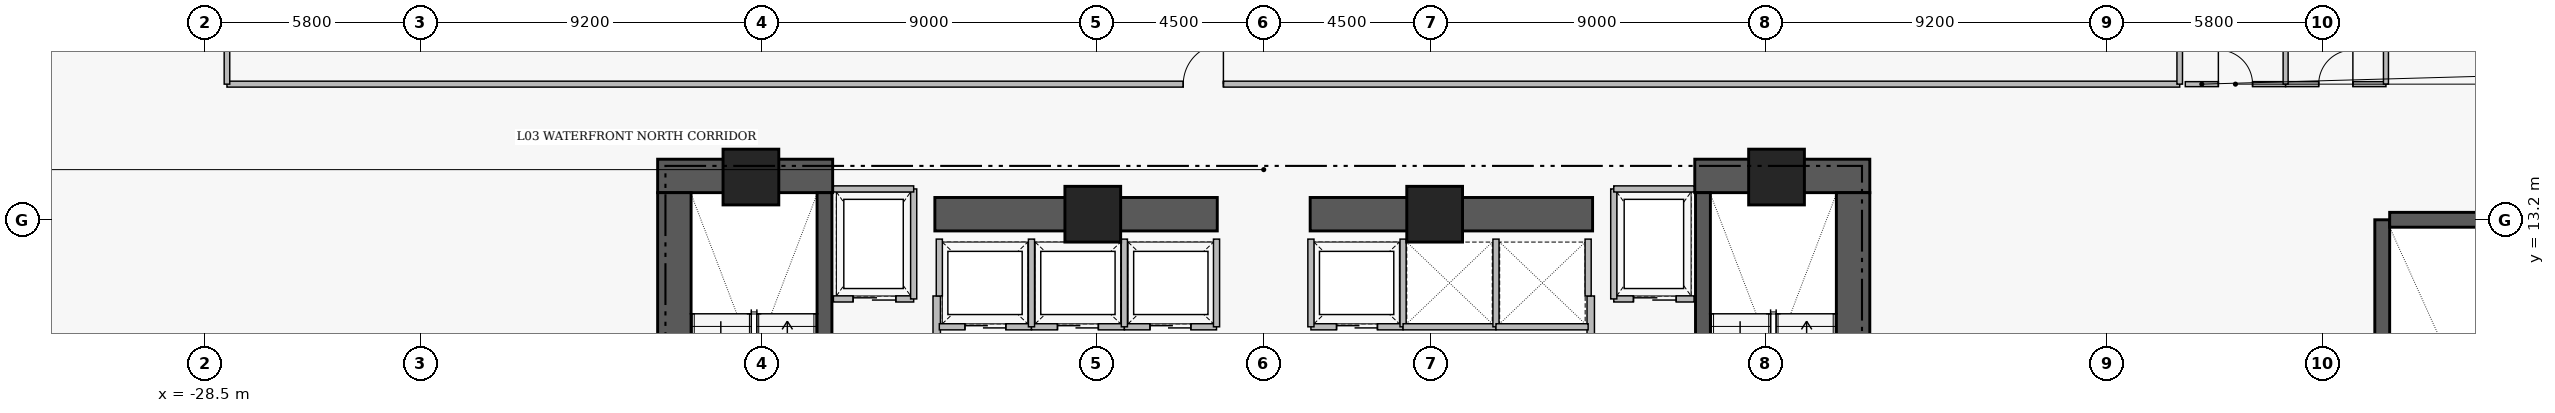
"""IFC4 building model, lengths in metres.
Left out: names, types, materials, properties, quantities, classifications, styles, units other than length and angle.
Written with IfcOpenShell. Run it as: python <this file> out.ifc"""

import sys

from ifc_helpers import new_model, si_unit, direction, frame, frame_2d, origin, origin_2d, place, context, subcontext, project, spatial, rectangle, extrude, element, fill, save


model = new_model("IFC4")
c1 = context("Model", 3, precision=1e-05, world=origin(), true_north=direction((0.0, 1.0)))
c2 = subcontext(c1, "Body", "Model", "MODEL_VIEW")
j1 = project(units=[si_unit("LENGTHUNIT", "METRE"), si_unit("PLANEANGLEUNIT", "RADIAN")], contexts=[c1])
p1 = place(None, origin())
s1 = spatial("IfcSite", under=j1, at=p1, CompositionType="ELEMENT")
p2 = place(p1, origin())
s2 = spatial("IfcBuilding", under=s1, at=p2, CompositionType="ELEMENT")
p3 = place(p2, frame((0.0, 0.0, 18.0)))
s3 = spatial("IfcBuildingStorey", under=s2, at=p3, CompositionType="ELEMENT", Elevation=18.0)
for number, where, z_axis, x_axis in (
    (1, (-16.31, 14.38, 0.0), (0.0, 0.0, 1.0), (1.0, 0.0, 0.0)),
    (2, (11.6, 14.38, 0.0), (0.0, 0.0, 1.0), (1.0, 0.0, 0.0)),
):
    element("IfcWall", number, at=place(p3, frame(where, z_axis=z_axis, x_axis=x_axis)), inside=s3, PredefinedType="SHEAR", context=c2, shape_type="SweptSolid", body=[
        extrude(rectangle(XDim=4.71, YDim=0.9, at=frame_2d((2.355, 0.0))), origin(), (0.0, 0.0, 1.0), 4.61),
    ])
for number, where, z_axis, x_axis in (
    (3, (-15.86, 4.97, 0.0), (0.0, 0.0, 1.0), (0.0, 1.0, 0.0)),
    (4, (15.86, 4.97, 0.0), (0.0, 0.0, 1.0), (0.0, 1.0, 0.0)),
):
    element("IfcWall", number, at=place(p3, frame(where, z_axis=z_axis, x_axis=x_axis)), inside=s3, PredefinedType="SHEAR", context=c2, shape_type="SweptSolid", body=[
        extrude(rectangle(XDim=8.96, YDim=0.9, at=frame_2d((4.48, 0.0))), origin(), (0.0, 0.0, 1.0), 4.61),
    ])
for number, where, z_axis, x_axis in (
    (5, (-8.85, 13.35, 0.0), (0.0, 0.0, 1.0), (1.0, 0.0, 0.0)),
    (6, (1.25, 13.35, 0.0), (0.0, 0.0, 1.0), (1.0, 0.0, 0.0)),
):
    element("IfcWall", number, at=place(p3, frame(where, z_axis=z_axis, x_axis=x_axis)), inside=s3, PredefinedType="SHEAR", context=c2, shape_type="SweptSolid", body=[
        extrude(rectangle(XDim=7.6, YDim=0.9, at=frame_2d((3.8, 0.0))), origin(), (0.0, 0.0, 1.0), 4.54),
    ])
p4 = place(p3, frame((-11.82, 4.97, 0.0), z_axis=(0.0, 0.0, 1.0), x_axis=(0.0, 1.0, 0.0)))
e7 = element("IfcWall", 7, at=p4, inside=s3, PredefinedType="SHEAR", context=c2, shape_type="SweptSolid", body=[
    extrude(rectangle(XDim=8.96, YDim=0.4, at=frame_2d((4.48, 0.0))), origin(), (0.0, 0.0, 1.0), 4.61),
])
p5 = place(p4, frame((0.31, 0.0, 0.0)))
e8 = element("IfcOpeningElement", 8, at=p5, cuts=e7, PredefinedType="OPENING", context=c2, shape_type="SweptSolid", body=[
    extrude(rectangle(XDim=1.12, YDim=2.22, at=frame_2d((0.56, 1.11))), frame((0.0, 0.21, 0.0), z_axis=(0.0, -1.0, 0.0), x_axis=(1.0, 0.0, 0.0)), (0.0, 0.0, 1.0), 0.42),
])
p6 = place(p3, frame((11.82, 13.93, 0.0), z_axis=(0.0, 0.0, 1.0), x_axis=(0.0, -1.0, 0.0)))
e9 = element("IfcWall", 9, at=p6, inside=s3, PredefinedType="SHEAR", context=c2, shape_type="SweptSolid", body=[
    extrude(rectangle(XDim=8.96, YDim=0.4, at=frame_2d((4.48, 0.0))), origin(), (0.0, 0.0, 1.0), 4.61),
])
p7 = place(p6, frame((7.53, 0.0, 0.0)))
e10 = element("IfcOpeningElement", 10, at=p7, cuts=e9, PredefinedType="OPENING", context=c2, shape_type="SweptSolid", body=[
    extrude(rectangle(XDim=1.12, YDim=2.22, at=frame_2d((0.56, 1.11))), frame((0.0, 0.21, 0.0), z_axis=(0.0, -1.0, 0.0), x_axis=(1.0, 0.0, 0.0)), (0.0, 0.0, 1.0), 0.42),
])
p8 = place(p3, frame((30.1, 13.2, 0.0), z_axis=(0.0, 0.0, 1.0), x_axis=(0.0, -1.0, 0.0)))
e11 = element("IfcWall", 11, at=p8, inside=s3, PredefinedType="SHEAR", context=c2, shape_type="SweptSolid", body=[
    extrude(rectangle(XDim=11.8, YDim=0.4, at=frame_2d((5.9, 0.0))), origin(), (0.0, 0.0, 1.0), 4.61),
])
p9 = place(p8, frame((9.7, 0.0, 0.0)))
e12 = element("IfcOpeningElement", 12, at=p9, cuts=e11, PredefinedType="OPENING", context=c2, shape_type="SweptSolid", body=[
    extrude(rectangle(XDim=1.12, YDim=2.22, at=frame_2d((0.56, 1.11))), frame((0.0, 0.21, 0.0), z_axis=(0.0, -1.0, 0.0), x_axis=(1.0, 0.0, 0.0)), (0.0, 0.0, 1.0), 0.42),
])
p10 = place(p3, frame((30.3, 13.2, 0.0), z_axis=(0.0, 0.0, 1.0), x_axis=(1.0, 0.0, 0.0)))
e13 = element("IfcWall", 13, at=p10, inside=s3, PredefinedType="SHEAR", context=c2, shape_type="SweptSolid", body=[
    extrude(rectangle(XDim=5.35, YDim=0.4, at=frame_2d((2.675, 0.0))), origin(), (0.0, 0.0, 1.0), 4.61),
])
for number, where, z_axis, x_axis in (
    (14, (-13.8, 14.35, 0.0), (0.0, 0.0, 1.0), (1.0, 0.0, 0.0)),
    (15, (-4.6, 13.35, 0.0), (0.0, 0.0, 1.0), (1.0, 0.0, 0.0)),
    (16, (4.6, 13.35, 0.0), (0.0, 0.0, 1.0), (1.0, 0.0, 0.0)),
    (17, (13.8, 14.35, 0.0), (0.0, 0.0, 1.0), (1.0, 0.0, 0.0)),
):
    element("IfcColumn", number, at=place(p3, frame(where, z_axis=z_axis, x_axis=x_axis)), inside=s3, PredefinedType="COLUMN", context=c2, shape_type="SweptSolid", body=[
        extrude(rectangle(XDim=1.5, YDim=1.5, at=origin_2d()), origin(), (0.0, 0.0, 1.0), 4.8),
    ])
p11 = place(p3, frame((-8.8, 5.05, 0.0), z_axis=(0.0, 0.0, 1.0), x_axis=(0.0, 1.0, 0.0)))
e18 = element("IfcWall", 18, at=p11, inside=s3, PredefinedType="PARTITIONING", context=c2, shape_type="SweptSolid", body=[
    extrude(rectangle(XDim=6.1, YDim=0.2, at=frame_2d((3.05, 0.0))), origin(), (0.0, 0.0, 1.0), 4.54),
])
p12 = place(p11, frame((0.25, 0.0, 0.0)))
e19 = element("IfcOpeningElement", 19, at=p12, cuts=e18, PredefinedType="OPENING", context=c2, shape_type="SweptSolid", body=[
    extrude(rectangle(XDim=1.1, YDim=2.2, at=frame_2d((0.55, 1.1))), frame((0.0, 0.11, 0.0), z_axis=(0.0, -1.0, 0.0), x_axis=(1.0, 0.0, 0.0)), (0.0, 0.0, 1.0), 0.22),
])
p13 = place(p11, frame((3.85, 0.0, 0.0)))
e20 = element("IfcOpeningElement", 20, at=p13, cuts=e18, PredefinedType="OPENING", context=c2, shape_type="SweptSolid", body=[
    extrude(rectangle(XDim=1.1, YDim=2.2, at=frame_2d((0.55, 1.1))), frame((0.0, 0.11, 0.0), z_axis=(0.0, -1.0, 0.0), x_axis=(1.0, 0.0, 0.0)), (0.0, 0.0, 1.0), 0.22),
])
p14 = place(p3, frame((8.8, 11.15, 0.0), z_axis=(0.0, 0.0, 1.0), x_axis=(0.0, -1.0, 0.0)))
e21 = element("IfcWall", 21, at=p14, inside=s3, PredefinedType="PARTITIONING", context=c2, shape_type="SweptSolid", body=[
    extrude(rectangle(XDim=6.1, YDim=0.2, at=frame_2d((3.05, 0.0))), origin(), (0.0, 0.0, 1.0), 4.54),
])
p15 = place(p14, frame((1.15, 0.0, 0.0)))
e22 = element("IfcOpeningElement", 22, at=p15, cuts=e21, PredefinedType="OPENING", context=c2, shape_type="SweptSolid", body=[
    extrude(rectangle(XDim=1.1, YDim=2.2, at=frame_2d((0.55, 1.1))), frame((0.0, 0.11, 0.0), z_axis=(0.0, -1.0, 0.0), x_axis=(1.0, 0.0, 0.0)), (0.0, 0.0, 1.0), 0.22),
])
p16 = place(p14, frame((4.75, 0.0, 0.0)))
e23 = element("IfcOpeningElement", 23, at=p16, cuts=e21, PredefinedType="OPENING", context=c2, shape_type="SweptSolid", body=[
    extrude(rectangle(XDim=1.1, YDim=2.2, at=frame_2d((0.55, 1.1))), frame((0.0, 0.11, 0.0), z_axis=(0.0, -1.0, 0.0), x_axis=(1.0, 0.0, 0.0)), (0.0, 0.0, 1.0), 0.22),
])
p17 = place(p3, frame((-11.58, 11.07, 0.0), z_axis=(0.0, 0.0, 1.0), x_axis=(1.0, 0.0, 0.0)))
e24 = element("IfcWall", 24, at=p17, inside=s3, PredefinedType="PARTITIONING", context=c2, shape_type="SweptSolid", body=[
    extrude(rectangle(XDim=2.16, YDim=0.165, at=frame_2d((1.08, 0.0))), origin(), (0.0, 0.0, 1.0), 4.54),
])
p18 = place(p17, frame((0.53, 0.0, 0.0)))
e25 = element("IfcOpeningElement", 25, at=p18, cuts=e24, PredefinedType="OPENING", context=c2, shape_type="SweptSolid", body=[
    extrude(rectangle(XDim=1.15, YDim=2.25, at=frame_2d((0.575, 1.125))), frame((0.0, 0.093, 0.0), z_axis=(0.0, -1.0, 0.0), x_axis=(1.0, 0.0, 0.0)), (0.0, 0.0, 1.0), 0.185),
])
p19 = place(p3, frame((9.42, 11.07, 0.0), z_axis=(0.0, 0.0, 1.0), x_axis=(1.0, 0.0, 0.0)))
e26 = element("IfcWall", 26, at=p19, inside=s3, PredefinedType="PARTITIONING", context=c2, shape_type="SweptSolid", body=[
    extrude(rectangle(XDim=2.16, YDim=0.165, at=frame_2d((1.08, 0.0))), origin(), (0.0, 0.0, 1.0), 4.54),
])
p20 = place(p19, frame((0.53, 0.0, 0.0)))
e27 = element("IfcOpeningElement", 27, at=p20, cuts=e26, PredefinedType="OPENING", context=c2, shape_type="SweptSolid", body=[
    extrude(rectangle(XDim=1.15, YDim=2.25, at=frame_2d((0.575, 1.125))), frame((0.0, 0.093, 0.0), z_axis=(0.0, -1.0, 0.0), x_axis=(1.0, 0.0, 0.0)), (0.0, 0.0, 1.0), 0.185),
])
p21 = place(p3, frame((-8.73, 10.32, 0.0), z_axis=(0.0, 0.0, 1.0), x_axis=(1.0, 0.0, 0.0)))
e28 = element("IfcWall", 28, at=p21, inside=s3, PredefinedType="PARTITIONING", context=c2, shape_type="SweptSolid", body=[
    extrude(rectangle(XDim=2.48, YDim=0.165, at=frame_2d((1.24, 0.0))), origin(), (0.0, 0.0, 1.0), 4.54),
])
p22 = place(p21, frame((0.69, 0.0, 0.0)))
e29 = element("IfcOpeningElement", 29, at=p22, cuts=e28, PredefinedType="OPENING", context=c2, shape_type="SweptSolid", body=[
    extrude(rectangle(XDim=1.1, YDim=2.25, at=frame_2d((0.55, 1.125))), frame((0.0, 0.093, 0.0), z_axis=(0.0, -1.0, 0.0), x_axis=(1.0, 0.0, 0.0)), (0.0, 0.0, 1.0), 0.185),
])
p23 = place(p3, frame((-6.25, 10.32, 0.0), z_axis=(0.0, 0.0, 1.0), x_axis=(1.0, 0.0, 0.0)))
e30 = element("IfcWall", 30, at=p23, inside=s3, PredefinedType="PARTITIONING", context=c2, shape_type="SweptSolid", body=[
    extrude(rectangle(XDim=2.5, YDim=0.165, at=frame_2d((1.25, 0.0))), origin(), (0.0, 0.0, 1.0), 4.54),
])
p24 = place(p23, frame((0.7, 0.0, 0.0)))
e31 = element("IfcOpeningElement", 31, at=p24, cuts=e30, PredefinedType="OPENING", context=c2, shape_type="SweptSolid", body=[
    extrude(rectangle(XDim=1.1, YDim=2.25, at=frame_2d((0.55, 1.125))), frame((0.0, 0.093, 0.0), z_axis=(0.0, -1.0, 0.0), x_axis=(1.0, 0.0, 0.0)), (0.0, 0.0, 1.0), 0.185),
])
p25 = place(p3, frame((-3.75, 10.32, 0.0), z_axis=(0.0, 0.0, 1.0), x_axis=(1.0, 0.0, 0.0)))
e32 = element("IfcWall", 32, at=p25, inside=s3, PredefinedType="PARTITIONING", context=c2, shape_type="SweptSolid", body=[
    extrude(rectangle(XDim=2.48, YDim=0.165, at=frame_2d((1.24, 0.0))), origin(), (0.0, 0.0, 1.0), 4.54),
])
p26 = place(p25, frame((0.69, 0.0, 0.0)))
e33 = element("IfcOpeningElement", 33, at=p26, cuts=e32, PredefinedType="OPENING", context=c2, shape_type="SweptSolid", body=[
    extrude(rectangle(XDim=1.1, YDim=2.25, at=frame_2d((0.55, 1.125))), frame((0.0, 0.093, 0.0), z_axis=(0.0, -1.0, 0.0), x_axis=(1.0, 0.0, 0.0)), (0.0, 0.0, 1.0), 0.185),
])
p27 = place(p3, frame((1.27, 10.32, 0.0), z_axis=(0.0, 0.0, 1.0), x_axis=(1.0, 0.0, 0.0)))
e34 = element("IfcWall", 34, at=p27, inside=s3, PredefinedType="PARTITIONING", context=c2, shape_type="SweptSolid", body=[
    extrude(rectangle(XDim=2.48, YDim=0.165, at=frame_2d((1.24, 0.0))), origin(), (0.0, 0.0, 1.0), 4.54),
])
p28 = place(p27, frame((0.69, 0.0, 0.0)))
e35 = element("IfcOpeningElement", 35, at=p28, cuts=e34, PredefinedType="OPENING", context=c2, shape_type="SweptSolid", body=[
    extrude(rectangle(XDim=1.1, YDim=2.25, at=frame_2d((0.55, 1.125))), frame((0.0, 0.093, 0.0), z_axis=(0.0, -1.0, 0.0), x_axis=(1.0, 0.0, 0.0)), (0.0, 0.0, 1.0), 0.185),
])
p29 = place(p3, frame((-27.9, 16.85, 0.0), z_axis=(0.0, 0.0, 1.0), x_axis=(1.0, 0.0, 0.0)))
e36 = element("IfcWall", 36, at=p29, inside=s3, PredefinedType="PARTITIONING", context=c2, shape_type="SweptSolid", body=[
    extrude(rectangle(XDim=52.55, YDim=0.16, at=frame_2d((26.275, 0.0))), origin(), (0.0, 0.0, 1.0), 4.007),
])
p30 = place(p29, frame((25.735, 0.0, 0.0)))
e37 = element("IfcOpeningElement", 37, at=p30, cuts=e36, PredefinedType="OPENING", context=c2, shape_type="SweptSolid", body=[
    extrude(rectangle(XDim=1.08, YDim=2.18, at=frame_2d((0.54, 1.09))), frame((0.0, 0.09, 0.0), z_axis=(0.0, -1.0, 0.0), x_axis=(1.0, 0.0, 0.0)), (0.0, 0.0, 1.0), 0.18),
])
p31 = place(p3, frame((24.8, 16.85, 0.0), z_axis=(0.0, 0.0, 1.0), x_axis=(1.0, 0.0, 0.0)))
e38 = element("IfcWall", 38, at=p31, inside=s3, PredefinedType="PLUMBINGWALL", context=c2, shape_type="SweptSolid", body=[
    extrude(rectangle(XDim=2.7, YDim=0.135, at=frame_2d((1.35, 0.0))), origin(), (0.0, 0.0, 1.0), 4.54),
])
p32 = place(p31, frame((0.89, 0.0, 0.0)))
e39 = element("IfcOpeningElement", 39, at=p32, cuts=e38, PredefinedType="OPENING", context=c2, shape_type="SweptSolid", body=[
    extrude(rectangle(XDim=0.92, YDim=2.12, at=frame_2d((0.46, 1.06))), frame((0.0, 0.077, 0.0), z_axis=(0.0, -1.0, 0.0), x_axis=(1.0, 0.0, 0.0)), (0.0, 0.0, 1.0), 0.155),
])
p33 = place(p3, frame((27.5, 16.85, 0.0), z_axis=(0.0, 0.0, 1.0), x_axis=(1.0, 0.0, 0.0)))
e40 = element("IfcWall", 40, at=p33, inside=s3, PredefinedType="PLUMBINGWALL", context=c2, shape_type="SweptSolid", body=[
    extrude(rectangle(XDim=2.7, YDim=0.135, at=frame_2d((1.35, 0.0))), origin(), (0.0, 0.0, 1.0), 4.54),
])
p34 = place(p33, frame((0.89, 0.0, 0.0)))
e41 = element("IfcOpeningElement", 41, at=p34, cuts=e40, PredefinedType="OPENING", context=c2, shape_type="SweptSolid", body=[
    extrude(rectangle(XDim=0.92, YDim=2.12, at=frame_2d((0.46, 1.06))), frame((0.0, 0.077, 0.0), z_axis=(0.0, -1.0, 0.0), x_axis=(1.0, 0.0, 0.0)), (0.0, 0.0, 1.0), 0.155),
])
p35 = place(p3, frame((-9.42, 11.07, 0.0), z_axis=(0.0, 0.0, 1.0), x_axis=(0.0, 1.0, 0.0)))
e42 = element("IfcWall", 42, at=p35, inside=s3, PredefinedType="PARTITIONING", context=c2, shape_type="SweptSolid", body=[
    extrude(rectangle(XDim=2.96, YDim=0.165, at=frame_2d((1.48, 0.0))), origin(), (0.0, 0.0, 1.0), 4.54),
])
p36 = place(p3, frame((-11.58, 14.03, 0.0), z_axis=(0.0, 0.0, 1.0), x_axis=(1.0, 0.0, 0.0)))
e43 = element("IfcWall", 43, at=p36, inside=s3, PredefinedType="PARTITIONING", context=c2, shape_type="SweptSolid", body=[
    extrude(rectangle(XDim=2.16, YDim=0.165, at=frame_2d((1.08, 0.0))), origin(), (0.0, 0.0, 1.0), 4.54),
])
p37 = place(p3, frame((9.42, 11.07, 0.0), z_axis=(0.0, 0.0, 1.0), x_axis=(0.0, 1.0, 0.0)))
e44 = element("IfcWall", 44, at=p37, inside=s3, PredefinedType="PARTITIONING", context=c2, shape_type="SweptSolid", body=[
    extrude(rectangle(XDim=2.96, YDim=0.165, at=frame_2d((1.48, 0.0))), origin(), (0.0, 0.0, 1.0), 4.54),
])
p38 = place(p3, frame((9.42, 14.03, 0.0), z_axis=(0.0, 0.0, 1.0), x_axis=(1.0, 0.0, 0.0)))
e45 = element("IfcWall", 45, at=p38, inside=s3, PredefinedType="PARTITIONING", context=c2, shape_type="SweptSolid", body=[
    extrude(rectangle(XDim=2.16, YDim=0.165, at=frame_2d((1.08, 0.0))), origin(), (0.0, 0.0, 1.0), 4.54),
])
p39 = place(p3, frame((-8.73, 11.15, 0.0), z_axis=(0.0, 0.0, 1.0), x_axis=(0.0, 1.0, 0.0)))
e46 = element("IfcWall", 46, at=p39, inside=s3, PredefinedType="PARTITIONING", context=c2, shape_type="SweptSolid", body=[
    extrude(rectangle(XDim=1.53, YDim=0.165, at=frame_2d((0.765, 0.0))), origin(), (0.0, 0.0, 1.0), 4.54),
])
for number, where, z_axis, x_axis in (
    (47, (-6.25, 10.32, 0.0), (0.0, 0.0, 1.0), (0.0, 1.0, 0.0)),
    (48, (-3.75, 10.32, 0.0), (0.0, 0.0, 1.0), (0.0, 1.0, 0.0)),
    (49, (-1.27, 10.32, 0.0), (0.0, 0.0, 1.0), (0.0, 1.0, 0.0)),
    (50, (1.27, 10.32, 0.0), (0.0, 0.0, 1.0), (0.0, 1.0, 0.0)),
    (51, (3.75, 10.32, 0.0), (0.0, 0.0, 1.0), (0.0, 1.0, 0.0)),
):
    element("IfcWall", number, at=place(p3, frame(where, z_axis=z_axis, x_axis=x_axis)), inside=s3, PredefinedType="PARTITIONING", context=c2, shape_type="SweptSolid", body=[
        extrude(rectangle(XDim=2.36, YDim=0.165, at=frame_2d((1.18, 0.0))), origin(), (0.0, 0.0, 1.0), 4.54),
    ])
p40 = place(p3, frame((3.75, 10.32, 0.0), z_axis=(0.0, 0.0, 1.0), x_axis=(1.0, 0.0, 0.0)))
e52 = element("IfcWall", 52, at=p40, inside=s3, PredefinedType="PARTITIONING", context=c2, shape_type="SweptSolid", body=[
    extrude(rectangle(XDim=2.5, YDim=0.165, at=frame_2d((1.25, 0.0))), origin(), (0.0, 0.0, 1.0), 4.54),
])
p41 = place(p3, frame((6.25, 10.32, 0.0), z_axis=(0.0, 0.0, 1.0), x_axis=(0.0, 1.0, 0.0)))
e53 = element("IfcWall", 53, at=p41, inside=s3, PredefinedType="PARTITIONING", context=c2, shape_type="SweptSolid", body=[
    extrude(rectangle(XDim=2.36, YDim=0.165, at=frame_2d((1.18, 0.0))), origin(), (0.0, 0.0, 1.0), 4.54),
])
p42 = place(p3, frame((6.25, 10.32, 0.0), z_axis=(0.0, 0.0, 1.0), x_axis=(1.0, 0.0, 0.0)))
e54 = element("IfcWall", 54, at=p42, inside=s3, PredefinedType="PARTITIONING", context=c2, shape_type="SweptSolid", body=[
    extrude(rectangle(XDim=2.48, YDim=0.165, at=frame_2d((1.24, 0.0))), origin(), (0.0, 0.0, 1.0), 4.54),
])
p43 = place(p3, frame((8.73, 11.15, 0.0), z_axis=(0.0, 0.0, 1.0), x_axis=(0.0, 1.0, 0.0)))
e55 = element("IfcWall", 55, at=p43, inside=s3, PredefinedType="PARTITIONING", context=c2, shape_type="SweptSolid", body=[
    extrude(rectangle(XDim=1.53, YDim=0.165, at=frame_2d((0.765, 0.0))), origin(), (0.0, 0.0, 1.0), 4.54),
])
for number, where, z_axis, x_axis in (
    (56, (-27.9, 16.85, 0.0), (0.0, 0.0, 1.0), (0.0, 1.0, 0.0)),
    (57, (24.65, 16.85, 0.0), (0.0, 0.0, 1.0), (0.0, 1.0, 0.0)),
):
    element("IfcWall", number, at=place(p3, frame(where, z_axis=z_axis, x_axis=x_axis)), inside=s3, PredefinedType="PARTITIONING", context=c2, shape_type="SweptSolid", body=[
        extrude(rectangle(XDim=8.09, YDim=0.15, at=frame_2d((4.045, 0.0))), origin(), (0.0, 0.0, 1.0), 4.54),
    ])
for number, where, z_axis, x_axis in (
    (58, (30.2, 16.85, 0.0), (0.0, 0.0, 1.0), (0.0, 1.0, 0.0)),
    (59, (27.5, 16.85, 0.0), (0.0, 0.0, 1.0), (0.0, 1.0, 0.0)),
):
    element("IfcWall", number, at=place(p3, frame(where, z_axis=z_axis, x_axis=x_axis)), inside=s3, PredefinedType="PLUMBINGWALL", context=c2, shape_type="SweptSolid", body=[
        extrude(rectangle(XDim=8.0, YDim=0.135, at=frame_2d((4.0, 0.0))), origin(), (0.0, 0.0, 1.0), 4.54),
    ])
p44 = place(p18, origin())
e60 = element("IfcDoor", 60, at=p44, inside=s3, OperationType="SLIDING_TO_LEFT", PredefinedType="DOOR", context=c2, shape_type="SweptSolid", body=[
    extrude(rectangle(XDim=1.15, YDim=2.25, at=frame_2d((0.575, 1.125))), frame((0.0, 0.025, 0.0), z_axis=(0.0, -1.0, 0.0), x_axis=(1.0, 0.0, 0.0)), (0.0, 0.0, 1.0), 0.05),
])
fill(e25, e60)
p45 = place(p20, origin())
e61 = element("IfcDoor", 61, at=p45, inside=s3, OperationType="SLIDING_TO_LEFT", PredefinedType="DOOR", context=c2, shape_type="SweptSolid", body=[
    extrude(rectangle(XDim=1.15, YDim=2.25, at=frame_2d((0.575, 1.125))), frame((0.0, 0.025, 0.0), z_axis=(0.0, -1.0, 0.0), x_axis=(1.0, 0.0, 0.0)), (0.0, 0.0, 1.0), 0.05),
])
fill(e27, e61)
p46 = place(p22, origin())
e62 = element("IfcDoor", 62, at=p46, inside=s3, OperationType="SLIDING_TO_LEFT", PredefinedType="DOOR", context=c2, shape_type="SweptSolid", body=[
    extrude(rectangle(XDim=1.1, YDim=2.25, at=frame_2d((0.55, 1.125))), frame((0.0, 0.025, 0.0), z_axis=(0.0, -1.0, 0.0), x_axis=(1.0, 0.0, 0.0)), (0.0, 0.0, 1.0), 0.05),
])
fill(e29, e62)
p47 = place(p24, origin())
e63 = element("IfcDoor", 63, at=p47, inside=s3, OperationType="SLIDING_TO_LEFT", PredefinedType="DOOR", context=c2, shape_type="SweptSolid", body=[
    extrude(rectangle(XDim=1.1, YDim=2.25, at=frame_2d((0.55, 1.125))), frame((0.0, 0.025, 0.0), z_axis=(0.0, -1.0, 0.0), x_axis=(1.0, 0.0, 0.0)), (0.0, 0.0, 1.0), 0.05),
])
fill(e31, e63)
p48 = place(p26, origin())
e64 = element("IfcDoor", 64, at=p48, inside=s3, OperationType="SLIDING_TO_LEFT", PredefinedType="DOOR", context=c2, shape_type="SweptSolid", body=[
    extrude(rectangle(XDim=1.1, YDim=2.25, at=frame_2d((0.55, 1.125))), frame((0.0, 0.025, 0.0), z_axis=(0.0, -1.0, 0.0), x_axis=(1.0, 0.0, 0.0)), (0.0, 0.0, 1.0), 0.05),
])
fill(e33, e64)
p49 = place(p28, origin())
e65 = element("IfcDoor", 65, at=p49, inside=s3, OperationType="SLIDING_TO_LEFT", PredefinedType="DOOR", context=c2, shape_type="SweptSolid", body=[
    extrude(rectangle(XDim=1.1, YDim=2.25, at=frame_2d((0.55, 1.125))), frame((0.0, 0.025, 0.0), z_axis=(0.0, -1.0, 0.0), x_axis=(1.0, 0.0, 0.0)), (0.0, 0.0, 1.0), 0.05),
])
fill(e35, e65)
p50 = place(p30, origin())
e66 = element("IfcDoor", 66, at=p50, inside=s3, OperationType="SINGLE_SWING_RIGHT", PredefinedType="DOOR", context=c2, shape_type="SweptSolid", body=[
    extrude(rectangle(XDim=1.08, YDim=2.18, at=frame_2d((0.54, 1.09))), frame((0.0, 0.025, 0.0), z_axis=(0.0, -1.0, 0.0), x_axis=(1.0, 0.0, 0.0)), (0.0, 0.0, 1.0), 0.05),
])
fill(e37, e66)
p51 = place(p32, origin())
e67 = element("IfcDoor", 67, at=p51, inside=s3, OperationType="SINGLE_SWING_LEFT", PredefinedType="DOOR", context=c2, shape_type="SweptSolid", body=[
    extrude(rectangle(XDim=0.92, YDim=2.12, at=frame_2d((0.46, 1.06))), frame((0.0, 0.025, 0.0), z_axis=(0.0, -1.0, 0.0), x_axis=(1.0, 0.0, 0.0)), (0.0, 0.0, 1.0), 0.05),
])
fill(e39, e67)
p52 = place(p34, origin())
e68 = element("IfcDoor", 68, at=p52, inside=s3, OperationType="SINGLE_SWING_RIGHT", PredefinedType="DOOR", context=c2, shape_type="SweptSolid", body=[
    extrude(rectangle(XDim=0.92, YDim=2.12, at=frame_2d((0.46, 1.06))), frame((0.0, 0.025, 0.0), z_axis=(0.0, -1.0, 0.0), x_axis=(1.0, 0.0, 0.0)), (0.0, 0.0, 1.0), 0.05),
])
fill(e41, e68)
save(model, sys.argv[1])
